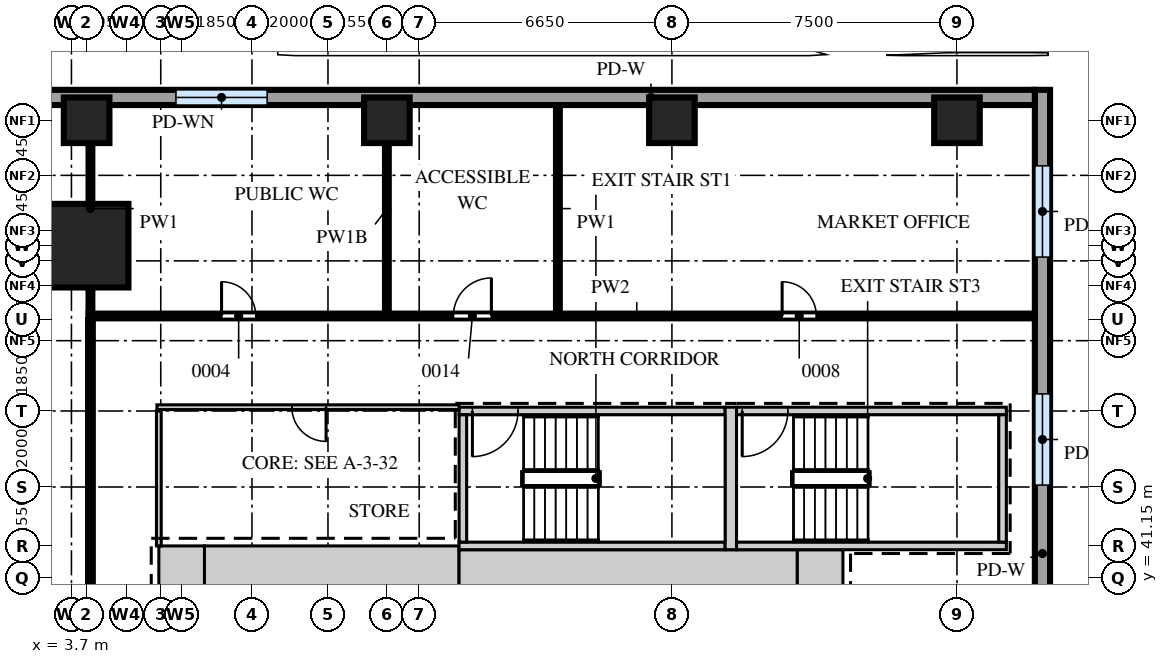
"""IFC4 building model, lengths in metres.
Left out: names, types, materials, properties, quantities, classifications, styles, units other than length and angle.
Written with IfcOpenShell. Run it as: python <this file> out.ifc"""

import sys

from ifc_helpers import new_model, si_unit, direction, frame, frame_2d, origin, origin_2d, place, context, subcontext, project, spatial, rectangle, extrude, source, transform, mapped, element, fill, save


model = new_model("IFC4")
c1 = context("Model", 3, precision=1e-05, world=origin(), true_north=direction((0.0, 1.0)))
c2 = subcontext(c1, "Body", "Model", "MODEL_VIEW")
j1 = project(units=[si_unit("LENGTHUNIT", "METRE"), si_unit("PLANEANGLEUNIT", "RADIAN")], contexts=[c1])
p1 = place(None, origin())
s1 = spatial("IfcSite", under=j1, at=p1, CompositionType="ELEMENT")
p2 = place(p1, origin())
s2 = spatial("IfcBuilding", under=s1, at=p2, CompositionType="ELEMENT")
p3 = place(p2, frame((0.0, 0.0, 7.5)))
s3 = spatial("IfcBuildingStorey", under=s2, at=p3, CompositionType="ELEMENT", Elevation=7.5)
m1 = source(origin(), c2, "Body", "SweptSolid", [
    extrude(rectangle(XDim=6.7, YDim=1.2, at=frame_2d((3.35, 0.0))), origin(), (0.0, 0.0, 1.0), 5.2),
])
p4 = place(p3, frame((7.2, 41.4, 0.0), z_axis=(0.0, 0.0, 1.0), x_axis=(1.0, 0.0, 0.0)))
e1 = element("IfcWall", 1, at=p4, inside=s3, PredefinedType="SHEAR", context=c2, shape_type="MappedRepresentation", body=[
    mapped(m1, transform((0.0, 0.0, 0.0))),
])
m2 = source(origin(), c2, "Body", "SweptSolid", [
    extrude(rectangle(XDim=8.9, YDim=1.1, at=frame_2d((4.45, 0.0))), origin(), (0.0, 0.0, 1.0), 5.2),
])
p5 = place(p3, frame((13.9, 41.35, 0.0), z_axis=(0.0, 0.0, 1.0), x_axis=(1.0, 0.0, 0.0)))
e2 = element("IfcWall", 2, at=p5, inside=s3, PredefinedType="SHEAR", context=c2, shape_type="MappedRepresentation", body=[
    mapped(m2, transform((0.0, 0.0, 0.0))),
])
m3 = source(origin(), c2, "Body", "SweptSolid", [
    extrude(rectangle(XDim=1.2, YDim=1.1, at=frame_2d((0.6, 0.0))), origin(), (0.0, 0.0, 1.0), 5.2),
])
p6 = place(p3, frame((22.8, 41.35, 0.0), z_axis=(0.0, 0.0, 1.0), x_axis=(1.0, 0.0, 0.0)))
e3 = element("IfcWall", 3, at=p6, inside=s3, PredefinedType="SHEAR", context=c2, shape_type="MappedRepresentation", body=[
    mapped(m3, transform((0.0, 0.0, 0.0))),
])
m4 = source(origin(), c2, "Body", "SweptSolid", [
    extrude(rectangle(XDim=1.2, YDim=1.2, at=frame_2d((0.6, 0.0))), origin(), (0.0, 0.0, 1.0), 5.2),
])
p7 = place(p3, frame((6.0, 41.4, 0.0), z_axis=(0.0, 0.0, 1.0), x_axis=(1.0, 0.0, 0.0)))
e4 = element("IfcWall", 4, at=p7, inside=s3, PredefinedType="SHEAR", context=c2, shape_type="MappedRepresentation", body=[
    mapped(m4, transform((0.0, 0.0, 0.0))),
])
m5 = source(origin(), c2, "Body", "SweptSolid", [
    extrude(rectangle(XDim=7.0, YDim=0.2, at=frame_2d((3.5, 0.0))), origin(), (0.0, 0.0, 1.0), 5.2),
])
p8 = place(p3, frame((13.9, 45.55, 0.0), z_axis=(0.0, 0.0, 1.0), x_axis=(1.0, 0.0, 0.0)))
e5 = element("IfcWall", 5, at=p8, inside=s3, PredefinedType="SHEAR", context=c2, shape_type="MappedRepresentation", body=[
    mapped(m5, transform((0.0, 0.0, 0.0))),
])
m6 = source(origin(), c2, "Body", "SweptSolid", [
    extrude(rectangle(XDim=1.2, YDim=2.1, at=frame_2d((0.6, 1.05))), frame((0.0, 0.11, 0.0), z_axis=(0.0, -1.0, 0.0), x_axis=(1.0, 0.0, 0.0)), (0.0, 0.0, 1.0), 0.22),
])
p9 = place(p8, frame((0.35, 0.0, 0.0)))
e6 = element("IfcOpeningElement", 6, at=p9, cuts=e5, PredefinedType="OPENING", context=c2, shape_type="MappedRepresentation", body=[
    mapped(m6, transform((0.0, 0.0, 0.0))),
])
p10 = place(p3, frame((13.9, 42.0, 0.0), z_axis=(0.0, 0.0, 1.0), x_axis=(1.0, 0.0, 0.0)))
e7 = element("IfcWall", 7, at=p10, inside=s3, PredefinedType="SHEAR", context=c2, shape_type="MappedRepresentation", body=[
    mapped(m5, transform((0.0, 0.0, 0.0))),
])
m7 = source(origin(), c2, "Body", "SweptSolid", [
    extrude(rectangle(XDim=7.1, YDim=0.2, at=frame_2d((3.55, 0.0))), origin(), (0.0, 0.0, 1.0), 5.2),
])
p11 = place(p3, frame((21.2, 45.55, 0.0), z_axis=(0.0, 0.0, 1.0), x_axis=(1.0, 0.0, 0.0)))
e8 = element("IfcWall", 8, at=p11, inside=s3, PredefinedType="SHEAR", context=c2, shape_type="MappedRepresentation", body=[
    mapped(m7, transform((0.0, 0.0, 0.0))),
])
p12 = place(p11, frame((0.15, 0.0, 0.0)))
e9 = element("IfcOpeningElement", 9, at=p12, cuts=e8, PredefinedType="OPENING", context=c2, shape_type="MappedRepresentation", body=[
    mapped(m6, transform((0.0, 0.0, 0.0))),
])
p13 = place(p3, frame((21.2, 42.0, 0.0), z_axis=(0.0, 0.0, 1.0), x_axis=(1.0, 0.0, 0.0)))
e10 = element("IfcWall", 10, at=p13, inside=s3, PredefinedType="SHEAR", context=c2, shape_type="MappedRepresentation", body=[
    mapped(m7, transform((0.0, 0.0, 0.0))),
])
m8 = source(origin(), c2, "Body", "SweptSolid", [
    extrude(rectangle(XDim=3.75, YDim=0.3, at=frame_2d((1.875, 0.0))), origin(), (0.0, 0.0, 1.0), 5.2),
])
p14 = place(p3, frame((21.05, 41.9, 0.0), z_axis=(0.0, 0.0, 1.0), x_axis=(0.0, 1.0, 0.0)))
e11 = element("IfcWall", 11, at=p14, inside=s3, PredefinedType="SHEAR", context=c2, shape_type="MappedRepresentation", body=[
    mapped(m8, transform((0.0, 0.0, 0.0))),
])
m9 = source(origin(), c2, "Body", "SweptSolid", [
    extrude(rectangle(XDim=3.35, YDim=0.2, at=frame_2d((1.675, 0.0))), origin(), (0.0, 0.0, 1.0), 5.2),
])
for number, where, z_axis, x_axis in (
    (12, (14.0, 42.1, 0.0), (0.0, 0.0, 1.0), (0.0, 1.0, 0.0)),
    (13, (28.2, 42.1, 0.0), (0.0, 0.0, 1.0), (0.0, 1.0, 0.0)),
):
    element("IfcWall", number, at=place(p3, frame(where, z_axis=z_axis, x_axis=x_axis)), inside=s3, PredefinedType="SHEAR", context=c2, shape_type="MappedRepresentation", body=[
        mapped(m9, transform((0.0, 0.0, 0.0))),
    ])
m10 = source(origin(), c2, "Body", "SweptSolid", [
    extrude(rectangle(XDim=2.2, YDim=2.2, at=origin_2d()), origin(), (0.0, 0.0, 1.0), 5.2),
])
p15 = place(p3, frame((4.1, 49.9, 0.0), z_axis=(0.0, 0.0, 1.0), x_axis=(1.0, 0.0, 0.0)))
e14 = element("IfcColumn", 14, at=p15, inside=s3, PredefinedType="COLUMN", context=c2, shape_type="MappedRepresentation", body=[
    mapped(m10, transform((0.0, 0.0, 0.0))),
])
m11 = source(origin(), c2, "Body", "SweptSolid", [
    extrude(rectangle(XDim=1.2, YDim=1.2, at=origin_2d()), origin(), (0.0, 0.0, 1.0), 5.2),
])
for number, where, z_axis, x_axis in (
    (15, (4.1, 53.2, 0.0), (0.0, 0.0, 1.0), (1.0, 0.0, 0.0)),
    (16, (12.0, 53.2, 0.0), (0.0, 0.0, 1.0), (1.0, 0.0, 0.0)),
    (17, (19.5, 53.2, 0.0), (0.0, 0.0, 1.0), (1.0, 0.0, 0.0)),
    (18, (27.0, 53.2, 0.0), (0.0, 0.0, 1.0), (1.0, 0.0, 0.0)),
):
    element("IfcColumn", number, at=place(p3, frame(where, z_axis=z_axis, x_axis=x_axis)), inside=s3, PredefinedType="COLUMN", context=c2, shape_type="MappedRepresentation", body=[
        mapped(m11, transform((0.0, 0.0, 0.0))),
    ])
m12 = source(origin(), c2, "Body", "SweptSolid", [
    extrude(rectangle(XDim=18.4, YDim=0.4, at=frame_2d((9.2, 0.0))), origin(), (0.0, 0.0, 1.0), 5.2),
])
p16 = place(p3, frame((29.25, 35.6, 0.0), z_axis=(0.0, 0.0, 1.0), x_axis=(0.0, 1.0, 0.0)))
e19 = element("IfcWall", 19, at=p16, inside=s3, PredefinedType="SOLIDWALL", context=c2, shape_type="MappedRepresentation", body=[
    mapped(m12, transform((0.0, 0.0, 0.0))),
])
m13 = source(origin(), c2, "Body", "SweptSolid", [
    extrude(rectangle(XDim=2.4, YDim=2.4, at=frame_2d((1.2, 1.2))), frame((0.0, 0.21, 0.0), z_axis=(0.0, -1.0, 0.0), x_axis=(1.0, 0.0, 0.0)), (0.0, 0.0, 1.0), 0.42),
])
p17 = place(p16, frame((2.0, 0.0, 1.0)))
e20 = element("IfcOpeningElement", 20, at=p17, cuts=e19, PredefinedType="OPENING", context=c2, shape_type="MappedRepresentation", body=[
    mapped(m13, transform((0.0, 0.0, 0.0))),
])
p18 = place(p16, frame((8.0, 0.0, 1.0)))
e21 = element("IfcOpeningElement", 21, at=p18, cuts=e19, PredefinedType="OPENING", context=c2, shape_type="MappedRepresentation", body=[
    mapped(m13, transform((0.0, 0.0, 0.0))),
])
p19 = place(p16, frame((14.0, 0.0, 1.0)))
e22 = element("IfcOpeningElement", 22, at=p19, cuts=e19, PredefinedType="OPENING", context=c2, shape_type="MappedRepresentation", body=[
    mapped(m13, transform((0.0, 0.0, 0.0))),
])
m14 = source(origin(), c2, "Body", "SweptSolid", [
    extrude(rectangle(XDim=30.84, YDim=0.4, at=frame_2d((15.42, 0.0))), origin(), (0.0, 0.0, 1.0), 5.2),
])
p20 = place(p3, frame((29.05, 53.8, 0.0), z_axis=(0.0, 0.0, 1.0), x_axis=(-1.0, 0.0, 0.0)))
e23 = element("IfcWall", 23, at=p20, inside=s3, PredefinedType="SOLIDWALL", context=c2, shape_type="MappedRepresentation", body=[
    mapped(m14, transform((0.0, 0.0, 0.0))),
])
p21 = place(p20, frame((20.2, 0.0, 1.0)))
e24 = element("IfcOpeningElement", 24, at=p21, cuts=e23, PredefinedType="OPENING", context=c2, shape_type="MappedRepresentation", body=[
    mapped(m13, transform((0.0, 0.0, 0.0))),
])
p22 = place(p20, frame((26.2, 0.0, 1.0)))
e25 = element("IfcOpeningElement", 25, at=p22, cuts=e23, PredefinedType="OPENING", context=c2, shape_type="MappedRepresentation", body=[
    mapped(m13, transform((0.0, 0.0, 0.0))),
])
m15 = source(origin(), c2, "Body", "SweptSolid", [
    extrude(rectangle(XDim=41.8, YDim=0.125, at=frame_2d((20.9, 0.0))), origin(), (0.0, 0.0, 1.0), 5.2),
])
p23 = place(p3, frame((4.2, 6.15, 0.0), z_axis=(0.0, 0.0, 1.0), x_axis=(0.0, 1.0, 0.0)))
e26 = element("IfcWall", 26, at=p23, inside=s3, PredefinedType="PARTITIONING", context=c2, shape_type="MappedRepresentation", body=[
    mapped(m15, transform((0.0, 0.0, 0.0))),
])
m16 = source(origin(), c2, "Body", "SweptSolid", [
    extrude(rectangle(XDim=1.2, YDim=2.1, at=frame_2d((0.6, 1.05))), frame((0.0, 0.073, 0.0), z_axis=(0.0, -1.0, 0.0), x_axis=(1.0, 0.0, 0.0)), (0.0, 0.0, 1.0), 0.145),
])
p24 = place(p23, frame((5.65, 0.0, 0.0)))
e27 = element("IfcOpeningElement", 27, at=p24, cuts=e26, PredefinedType="OPENING", context=c2, shape_type="MappedRepresentation", body=[
    mapped(m16, transform((0.0, 0.0, 0.0))),
])
p25 = place(p23, frame((16.5, 0.0, 0.0)))
e28 = element("IfcOpeningElement", 28, at=p25, cuts=e26, PredefinedType="OPENING", context=c2, shape_type="MappedRepresentation", body=[
    mapped(m16, transform((0.0, 0.0, 0.0))),
])
p26 = place(p23, frame((31.05, 0.0, 0.0)))
e29 = element("IfcOpeningElement", 29, at=p26, cuts=e26, PredefinedType="OPENING", context=c2, shape_type="MappedRepresentation", body=[
    mapped(m16, transform((0.0, 0.0, 0.0))),
])
m17 = source(origin(), c2, "Body", "SweptSolid", [
    extrude(rectangle(XDim=3.55, YDim=0.125, at=frame_2d((1.775, 0.0))), origin(), (0.0, 0.0, 1.0), 5.2),
])
p27 = place(p3, frame((6.0, 42.0, 0.0), z_axis=(0.0, 0.0, 1.0), x_axis=(0.0, 1.0, 0.0)))
e30 = element("IfcWall", 30, at=p27, inside=s3, PredefinedType="PARTITIONING", context=c2, shape_type="MappedRepresentation", body=[
    mapped(m17, transform((0.0, 0.0, 0.0))),
])
m18 = source(origin(), c2, "Body", "SweptSolid", [
    extrude(rectangle(XDim=7.95, YDim=0.125, at=frame_2d((3.975, 0.0))), origin(), (0.0, 0.0, 1.0), 5.2),
])
p28 = place(p3, frame((5.95, 45.65, 0.0), z_axis=(0.0, 0.0, 1.0), x_axis=(1.0, 0.0, 0.0)))
e31 = element("IfcWall", 31, at=p28, inside=s3, PredefinedType="PARTITIONING", context=c2, shape_type="MappedRepresentation", body=[
    mapped(m18, transform((0.0, 0.0, 0.0))),
])
m19 = source(origin(), c2, "Body", "SweptSolid", [
    extrude(rectangle(XDim=0.9, YDim=2.1, at=frame_2d((0.45, 1.05))), frame((0.0, 0.073, 0.0), z_axis=(0.0, -1.0, 0.0), x_axis=(1.0, 0.0, 0.0)), (0.0, 0.0, 1.0), 0.145),
])
p29 = place(p28, frame((3.55, 0.0, 0.0)))
e32 = element("IfcOpeningElement", 32, at=p29, cuts=e31, PredefinedType="OPENING", context=c2, shape_type="MappedRepresentation", body=[
    mapped(m19, transform((0.0, 0.0, 0.0))),
])
m20 = source(origin(), c2, "Body", "SweptSolid", [
    extrude(rectangle(XDim=24.9, YDim=0.125, at=frame_2d((12.45, 0.0))), origin(), (0.0, 0.0, 1.0), 5.2),
])
p30 = place(p3, frame((4.15, 48.05, 0.0), z_axis=(0.0, 0.0, 1.0), x_axis=(1.0, 0.0, 0.0)))
e33 = element("IfcWall", 33, at=p30, inside=s3, PredefinedType="PARTITIONING", context=c2, shape_type="MappedRepresentation", body=[
    mapped(m20, transform((0.0, 0.0, 0.0))),
])
p31 = place(p30, frame((3.5, 0.0, 0.0)))
e34 = element("IfcOpeningElement", 34, at=p31, cuts=e33, PredefinedType="OPENING", context=c2, shape_type="MappedRepresentation", body=[
    mapped(m19, transform((0.0, 0.0, 0.0))),
])
m21 = source(origin(), c2, "Body", "SweptSolid", [
    extrude(rectangle(XDim=1.0, YDim=2.1, at=frame_2d((0.5, 1.05))), frame((0.0, 0.073, 0.0), z_axis=(0.0, -1.0, 0.0), x_axis=(1.0, 0.0, 0.0)), (0.0, 0.0, 1.0), 0.145),
])
p32 = place(p30, frame((9.6, 0.0, 0.0)))
e35 = element("IfcOpeningElement", 35, at=p32, cuts=e33, PredefinedType="OPENING", context=c2, shape_type="MappedRepresentation", body=[
    mapped(m21, transform((0.0, 0.0, 0.0))),
])
p33 = place(p30, frame((18.25, 0.0, 0.0)))
e36 = element("IfcOpeningElement", 36, at=p33, cuts=e33, PredefinedType="OPENING", context=c2, shape_type="MappedRepresentation", body=[
    mapped(m19, transform((0.0, 0.0, 0.0))),
])
m22 = source(origin(), c2, "Body", "SweptSolid", [
    extrude(rectangle(XDim=5.45, YDim=0.1, at=frame_2d((2.725, 0.0))), origin(), (0.0, 0.0, 1.0), 5.2),
])
p34 = place(p3, frame((4.2, 48.15, 0.0), z_axis=(0.0, 0.0, 1.0), x_axis=(0.0, 1.0, 0.0)))
e37 = element("IfcWall", 37, at=p34, inside=s3, PredefinedType="PARTITIONING", context=c2, shape_type="MappedRepresentation", body=[
    mapped(m22, transform((0.0, 0.0, 0.0))),
])
m23 = source(origin(), c2, "Body", "SweptSolid", [
    extrude(rectangle(XDim=5.45, YDim=0.1, at=frame_2d((2.725, 0.0))), origin(), (0.0, 0.0, 1.0), 4.7),
])
p35 = place(p3, frame((12.0, 48.15, 0.0), z_axis=(0.0, 0.0, 1.0), x_axis=(0.0, 1.0, 0.0)))
e38 = element("IfcWall", 38, at=p35, inside=s3, PredefinedType="PARTITIONING", context=c2, shape_type="MappedRepresentation", body=[
    mapped(m23, transform((0.0, 0.0, 0.0))),
])
p36 = place(p3, frame((16.5, 48.15, 0.0), z_axis=(0.0, 0.0, 1.0), x_axis=(0.0, 1.0, 0.0)))
e39 = element("IfcWall", 39, at=p36, inside=s3, PredefinedType="PARTITIONING", context=c2, shape_type="MappedRepresentation", body=[
    mapped(m22, transform((0.0, 0.0, 0.0))),
])
m24 = source(origin(), c2, "Body", "SweptSolid", [
    extrude(rectangle(XDim=2.4, YDim=2.4, at=frame_2d((1.2, 1.2))), frame((0.0, 0.03, 0.0), z_axis=(0.0, -1.0, 0.0), x_axis=(1.0, 0.0, 0.0)), (0.0, 0.0, 1.0), 0.06),
])
p37 = place(p18, origin())
e40 = element("IfcWindow", 40, at=p37, inside=s3, PartitioningType="SINGLE_PANEL", PredefinedType="WINDOW", context=c2, shape_type="MappedRepresentation", body=[
    mapped(m24, transform((0.0, 0.0, 0.0))),
])
fill(e21, e40)
p38 = place(p19, origin())
e41 = element("IfcWindow", 41, at=p38, inside=s3, PartitioningType="SINGLE_PANEL", PredefinedType="WINDOW", context=c2, shape_type="MappedRepresentation", body=[
    mapped(m24, transform((0.0, 0.0, 0.0))),
])
fill(e22, e41)
p39 = place(p21, origin())
e42 = element("IfcWindow", 42, at=p39, inside=s3, PartitioningType="SINGLE_PANEL", PredefinedType="WINDOW", context=c2, shape_type="MappedRepresentation", body=[
    mapped(m24, transform((0.0, 0.0, 0.0))),
])
fill(e24, e42)
m25 = source(origin(), c2, "Body", "SweptSolid", [
    extrude(rectangle(XDim=0.9, YDim=2.1, at=frame_2d((0.45, 1.05))), frame((0.0, 0.025, 0.0), z_axis=(0.0, -1.0, 0.0), x_axis=(1.0, 0.0, 0.0)), (0.0, 0.0, 1.0), 0.05),
])
p40 = place(p31, origin())
e43 = element("IfcDoor", 43, at=p40, inside=s3, OperationType="SINGLE_SWING_RIGHT", PredefinedType="DOOR", context=c2, shape_type="MappedRepresentation", body=[
    mapped(m25, transform((0.0, 0.0, 0.0))),
])
fill(e34, e43)
m26 = source(origin(), c2, "Body", "SweptSolid", [
    extrude(rectangle(XDim=1.0, YDim=2.1, at=frame_2d((0.5, 1.05))), frame((0.0, 0.025, 0.0), z_axis=(0.0, -1.0, 0.0), x_axis=(1.0, 0.0, 0.0)), (0.0, 0.0, 1.0), 0.05),
])
p41 = place(p32, origin())
e44 = element("IfcDoor", 44, at=p41, inside=s3, OperationType="SINGLE_SWING_LEFT", PredefinedType="DOOR", context=c2, shape_type="MappedRepresentation", body=[
    mapped(m26, transform((0.0, 0.0, 0.0))),
])
fill(e35, e44)
p42 = place(p33, origin())
e45 = element("IfcDoor", 45, at=p42, inside=s3, OperationType="SINGLE_SWING_RIGHT", PredefinedType="DOOR", context=c2, shape_type="MappedRepresentation", body=[
    mapped(m25, transform((0.0, 0.0, 0.0))),
])
fill(e36, e45)
p43 = place(p29, origin())
e46 = element("IfcDoor", 46, at=p43, inside=s3, OperationType="SINGLE_SWING_RIGHT", PredefinedType="DOOR", context=c2, shape_type="MappedRepresentation", body=[
    mapped(m25, transform((0.0, 0.0, 0.0))),
])
fill(e32, e46)
m27 = source(origin(), c2, "Body", "SweptSolid", [
    extrude(rectangle(XDim=1.2, YDim=2.1, at=frame_2d((0.6, 1.05))), frame((0.0, 0.025, 0.0), z_axis=(0.0, -1.0, 0.0), x_axis=(1.0, 0.0, 0.0)), (0.0, 0.0, 1.0), 0.05),
])
p44 = place(p9, origin())
e47 = element("IfcDoor", 47, at=p44, inside=s3, OperationType="SINGLE_SWING_LEFT", PredefinedType="DOOR", context=c2, shape_type="MappedRepresentation", body=[
    mapped(m27, transform((0.0, 0.0, 0.0))),
])
fill(e6, e47)
p45 = place(p12, origin())
e48 = element("IfcDoor", 48, at=p45, inside=s3, OperationType="SINGLE_SWING_LEFT", PredefinedType="DOOR", context=c2, shape_type="MappedRepresentation", body=[
    mapped(m27, transform((0.0, 0.0, 0.0))),
])
fill(e9, e48)
save(model, sys.argv[1])
